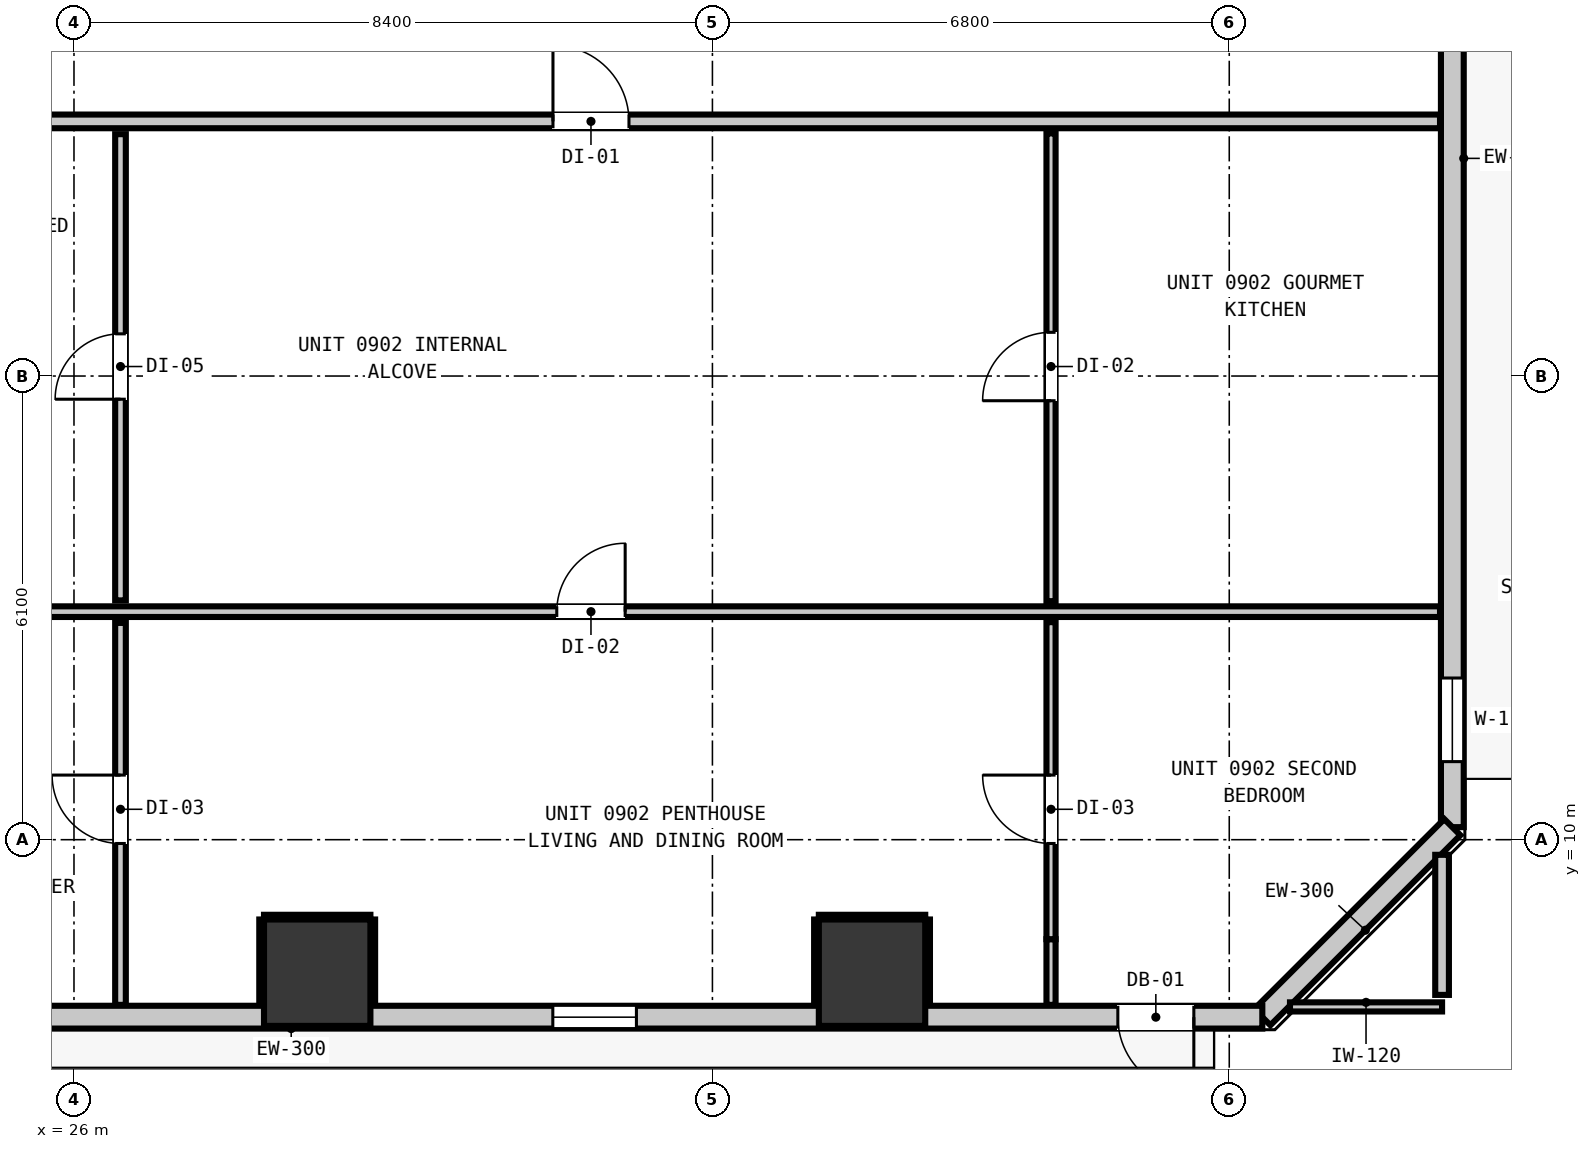
"""IFC4 building model, lengths in metres.
Left out: names, types, materials, properties, quantities, classifications, styles, units other than length and angle.
Written with IfcOpenShell. Run it as: python <this file> out.ifc"""

import sys

from ifc_helpers import new_model, si_unit, direction, frame, frame_2d, origin, origin_2d, place, context, subcontext, project, spatial, rectangle, extrude, element, fill, save


model = new_model("IFC4")
c1 = context("Model", 3, precision=1e-05, world=origin(), true_north=direction((0.0, 1.0)))
c2 = subcontext(c1, "Body", "Model", "MODEL_VIEW")
j1 = project(units=[si_unit("LENGTHUNIT", "METRE"), si_unit("PLANEANGLEUNIT", "RADIAN")], contexts=[c1])
p1 = place(None, origin())
s1 = spatial("IfcSite", under=j1, at=p1, CompositionType="ELEMENT")
p2 = place(p1, origin())
s2 = spatial("IfcBuilding", under=s1, at=p2, CompositionType="ELEMENT")
p3 = place(p2, frame((0.0, 0.0, 35.28)))
s3 = spatial("IfcBuildingStorey", under=s2, at=p3, CompositionType="ELEMENT", Elevation=35.28)
for number, where, z_axis, x_axis in (
    (1, (29.2, 8.25, 0.0), (0.0, 0.0, 1.0), (1.0, 0.0, 0.0)),
    (2, (36.5, 8.25, 0.0), (0.0, 0.0, 1.0), (1.0, 0.0, 0.0)),
):
    element("IfcColumn", number, at=place(p3, frame(where, z_axis=z_axis, x_axis=x_axis)), inside=s3, PredefinedType="COLUMN", context=c2, shape_type="SweptSolid", body=[
        extrude(rectangle(XDim=1.4, YDim=1.4, at=origin_2d()), origin(), (0.0, 0.0, 1.0), 3.32),
    ])
p4 = place(p3, frame((44.135, 44.835, 0.0), z_axis=(0.0, 0.0, 1.0), x_axis=(0.0, -1.0, 0.0)))
e3 = element("IfcWall", 3, at=p4, inside=s3, PredefinedType="STANDARD", context=c2, shape_type="SweptSolid", body=[
    extrude(rectangle(XDim=34.67, YDim=0.3, at=frame_2d((17.335, 0.0))), origin(), (0.0, 0.0, 1.0), 3.06),
])
p5 = place(p4, frame((1.251, 0.0, 0.0)))
e4 = element("IfcOpeningElement", 4, at=p5, cuts=e3, PredefinedType="OPENING", context=c2, shape_type="SweptSolid", body=[
    extrude(rectangle(XDim=1.0, YDim=2.15, at=frame_2d((0.5, 1.075))), frame((0.0, 0.16, 0.0), z_axis=(0.0, -1.0, 0.0), x_axis=(1.0, 0.0, 0.0)), (0.0, 0.0, 1.0), 0.32),
])
p6 = place(p4, frame((32.708, 0.0, 0.85)))
e5 = element("IfcOpeningElement", 5, at=p6, cuts=e3, PredefinedType="OPENING", context=c2, shape_type="SweptSolid", body=[
    extrude(rectangle(XDim=1.1, YDim=2.05, at=frame_2d((0.55, 1.025))), frame((0.0, 0.16, 0.0), z_axis=(0.0, -1.0, 0.0), x_axis=(1.0, 0.0, 0.0)), (0.0, 0.0, 1.0), 0.32),
])
p7 = place(p4, frame((17.935, 0.0, 0.85)))
e6 = element("IfcOpeningElement", 6, at=p7, cuts=e3, PredefinedType="OPENING", context=c2, shape_type="SweptSolid", body=[
    extrude(rectangle(XDim=1.1, YDim=2.05, at=frame_2d((0.55, 1.025))), frame((0.0, 0.16, 0.0), z_axis=(0.0, -1.0, 0.0), x_axis=(1.0, 0.0, 0.0)), (0.0, 0.0, 1.0), 0.32),
])
p8 = place(p4, frame((6.959, 0.0, 0.85)))
e7 = element("IfcOpeningElement", 7, at=p8, cuts=e3, PredefinedType="OPENING", context=c2, shape_type="SweptSolid", body=[
    extrude(rectangle(XDim=1.1, YDim=2.05, at=frame_2d((0.55, 1.025))), frame((0.0, 0.16, 0.0), z_axis=(0.0, -1.0, 0.0), x_axis=(1.0, 0.0, 0.0)), (0.0, 0.0, 1.0), 0.32),
])
p9 = place(p3, frame((44.135, 10.165, 0.0), z_axis=(0.0, 0.0, 1.0), x_axis=(-0.707106781187, -0.707106781187, 0.0)))
e8 = element("IfcWall", 8, at=p9, inside=s3, PredefinedType="STANDARD", context=c2, shape_type="SweptSolid", body=[
    extrude(rectangle(XDim=3.536, YDim=0.3, at=frame_2d((1.768, 0.0))), origin(), (0.0, 0.0, 1.0), 3.06),
])
p10 = place(p3, frame((41.635, 7.665, 0.0), z_axis=(0.0, 0.0, 1.0), x_axis=(-1.0, 0.0, 0.0)))
e9 = element("IfcWall", 9, at=p10, inside=s3, PredefinedType="STANDARD", context=c2, shape_type="SweptSolid", body=[
    extrude(rectangle(XDim=37.47, YDim=0.3, at=frame_2d((18.735, 0.0))), origin(), (0.0, 0.0, 1.0), 3.06),
])
p11 = place(p10, frame((0.901, 0.0, 0.0)))
e10 = element("IfcOpeningElement", 10, at=p11, cuts=e9, PredefinedType="OPENING", context=c2, shape_type="SweptSolid", body=[
    extrude(rectangle(XDim=1.0, YDim=2.15, at=frame_2d((0.5, 1.075))), frame((0.0, 0.16, 0.0), z_axis=(0.0, -1.0, 0.0), x_axis=(1.0, 0.0, 0.0)), (0.0, 0.0, 1.0), 0.32),
])
p12 = place(p10, frame((32.595, 0.0, 0.85)))
e11 = element("IfcOpeningElement", 11, at=p12, cuts=e9, PredefinedType="OPENING", context=c2, shape_type="SweptSolid", body=[
    extrude(rectangle(XDim=1.1, YDim=2.05, at=frame_2d((0.55, 1.025))), frame((0.0, 0.16, 0.0), z_axis=(0.0, -1.0, 0.0), x_axis=(1.0, 0.0, 0.0)), (0.0, 0.0, 1.0), 0.32),
])
p13 = place(p10, frame((36.621, 0.0, 0.85)))
e12 = element("IfcOpeningElement", 12, at=p13, cuts=e9, PredefinedType="OPENING", context=c2, shape_type="SweptSolid", body=[
    extrude(rectangle(XDim=0.58, YDim=1.5, at=frame_2d((0.29, 0.75))), frame((0.0, 0.16, 0.0), z_axis=(0.0, -1.0, 0.0), x_axis=(1.0, 0.0, 0.0)), (0.0, 0.0, 1.0), 0.32),
])
p14 = place(p10, frame((25.295, 0.0, 0.85)))
e13 = element("IfcOpeningElement", 13, at=p14, cuts=e9, PredefinedType="OPENING", context=c2, shape_type="SweptSolid", body=[
    extrude(rectangle(XDim=1.1, YDim=2.05, at=frame_2d((0.55, 1.025))), frame((0.0, 0.16, 0.0), z_axis=(0.0, -1.0, 0.0), x_axis=(1.0, 0.0, 0.0)), (0.0, 0.0, 1.0), 0.32),
])
p15 = place(p10, frame((22.195, 0.0, 0.85)))
e14 = element("IfcOpeningElement", 14, at=p15, cuts=e9, PredefinedType="OPENING", context=c2, shape_type="SweptSolid", body=[
    extrude(rectangle(XDim=1.1, YDim=2.05, at=frame_2d((0.55, 1.025))), frame((0.0, 0.16, 0.0), z_axis=(0.0, -1.0, 0.0), x_axis=(1.0, 0.0, 0.0)), (0.0, 0.0, 1.0), 0.32),
])
p16 = place(p10, frame((8.235, 0.0, 0.85)))
e15 = element("IfcOpeningElement", 15, at=p16, cuts=e9, PredefinedType="OPENING", context=c2, shape_type="SweptSolid", body=[
    extrude(rectangle(XDim=1.1, YDim=2.05, at=frame_2d((0.55, 1.025))), frame((0.0, 0.16, 0.0), z_axis=(0.0, -1.0, 0.0), x_axis=(1.0, 0.0, 0.0)), (0.0, 0.0, 1.0), 0.32),
])
p17 = place(p10, frame((16.219, 0.0, 0.85)))
e16 = element("IfcOpeningElement", 16, at=p17, cuts=e9, PredefinedType="OPENING", context=c2, shape_type="SweptSolid", body=[
    extrude(rectangle(XDim=1.1, YDim=2.05, at=frame_2d((0.55, 1.025))), frame((0.0, 0.16, 0.0), z_axis=(0.0, -1.0, 0.0), x_axis=(1.0, 0.0, 0.0)), (0.0, 0.0, 1.0), 0.32),
])
p18 = place(p3, frame((1.827, 19.45, 0.0), z_axis=(0.0, 0.0, 1.0), x_axis=(1.0, 0.0, 0.0)))
e17 = element("IfcWall", 17, at=p18, inside=s3, PredefinedType="PARTITIONING", context=c2, shape_type="SweptSolid", body=[
    extrude(rectangle(XDim=42.146, YDim=0.18, at=frame_2d((21.073, 0.0))), origin(), (0.0, 0.0, 1.0), 3.06),
])
p19 = place(p18, frame((8.602, 0.0, 0.0)))
e18 = element("IfcOpeningElement", 18, at=p19, cuts=e17, PredefinedType="OPENING", context=c2, shape_type="SweptSolid", body=[
    extrude(rectangle(XDim=1.0, YDim=2.15, at=frame_2d((0.5, 1.075))), frame((0.0, 0.1, 0.0), z_axis=(0.0, -1.0, 0.0), x_axis=(1.0, 0.0, 0.0)), (0.0, 0.0, 1.0), 0.2),
])
p20 = place(p18, frame((30.475, 0.0, 0.0)))
e19 = element("IfcOpeningElement", 19, at=p20, cuts=e17, PredefinedType="OPENING", context=c2, shape_type="SweptSolid", body=[
    extrude(rectangle(XDim=1.0, YDim=2.15, at=frame_2d((0.5, 1.075))), frame((0.0, 0.1, 0.0), z_axis=(0.0, -1.0, 0.0), x_axis=(1.0, 0.0, 0.0)), (0.0, 0.0, 1.0), 0.2),
])
p21 = place(p3, frame((11.688, 13.0, 0.0), z_axis=(0.0, 0.0, 1.0), x_axis=(1.0, 0.0, 0.0)))
e20 = element("IfcWall", 20, at=p21, inside=s3, PredefinedType="PARTITIONING", context=c2, shape_type="SweptSolid", body=[
    extrude(rectangle(XDim=32.285, YDim=0.14, at=frame_2d((16.143, 0.0))), origin(), (0.0, 0.0, 1.0), 3.06),
])
p22 = place(p21, frame((20.664, 0.0, 0.0)))
e21 = element("IfcOpeningElement", 21, at=p22, cuts=e20, PredefinedType="OPENING", context=c2, shape_type="SweptSolid", body=[
    extrude(rectangle(XDim=0.9, YDim=2.1, at=frame_2d((0.45, 1.05))), frame((0.0, 0.08, 0.0), z_axis=(0.0, -1.0, 0.0), x_axis=(1.0, 0.0, 0.0)), (0.0, 0.0, 1.0), 0.16),
])
p23 = place(p3, frame((41.999, 7.8, 0.0), z_axis=(0.0, 0.0, 1.0), x_axis=(1.0, 0.0, 0.0)))
e22 = element("IfcWall", 22, at=p23, inside=s3, PredefinedType="PARTITIONING", context=c2, shape_type="SweptSolid", body=[
    extrude(rectangle(XDim=2.001, YDim=0.12, at=frame_2d((1.0, 0.0))), origin(), (0.0, 0.0, 1.0), 3.06),
])
p24 = place(p3, frame((44.0, 7.958, 0.0), z_axis=(0.0, 0.0, 1.0), x_axis=(0.0, 1.0, 0.0)))
e23 = element("IfcWall", 23, at=p24, inside=s3, PredefinedType="PARTITIONING", context=c2, shape_type="SweptSolid", body=[
    extrude(rectangle(XDim=1.843, YDim=0.18, at=frame_2d((0.921, 0.0))), origin(), (0.0, 0.0, 1.0), 3.06),
])
p25 = place(p3, frame((26.612, 7.827, 0.0), z_axis=(0.0, 0.0, 1.0), x_axis=(0.0, 1.0, 0.0)))
e24 = element("IfcWall", 24, at=p25, inside=s3, PredefinedType="PARTITIONING", context=c2, shape_type="SweptSolid", body=[
    extrude(rectangle(XDim=5.025, YDim=0.14, at=frame_2d((2.513, 0.0))), origin(), (0.0, 0.0, 1.0), 3.06),
])
p26 = place(p25, frame((2.123, 0.0, 0.0)))
e25 = element("IfcOpeningElement", 25, at=p26, cuts=e24, PredefinedType="OPENING", context=c2, shape_type="SweptSolid", body=[
    extrude(rectangle(XDim=0.9, YDim=2.1, at=frame_2d((0.45, 1.05))), frame((0.0, 0.08, 0.0), z_axis=(0.0, -1.0, 0.0), x_axis=(1.0, 0.0, 0.0)), (0.0, 0.0, 1.0), 0.16),
])
p27 = place(p3, frame((26.612, 13.148, 0.0), z_axis=(0.0, 0.0, 1.0), x_axis=(0.0, 1.0, 0.0)))
e26 = element("IfcWall", 26, at=p27, inside=s3, PredefinedType="PARTITIONING", context=c2, shape_type="SweptSolid", body=[
    extrude(rectangle(XDim=6.134, YDim=0.14, at=frame_2d((3.067, 0.0))), origin(), (0.0, 0.0, 1.0), 3.06),
])
p28 = place(p27, frame((2.647, 0.0, 0.0)))
e27 = element("IfcOpeningElement", 27, at=p28, cuts=e26, PredefinedType="OPENING", context=c2, shape_type="SweptSolid", body=[
    extrude(rectangle(XDim=0.86, YDim=2.02, at=frame_2d((0.43, 1.01))), frame((0.0, 0.08, 0.0), z_axis=(0.0, -1.0, 0.0), x_axis=(1.0, 0.0, 0.0)), (0.0, 0.0, 1.0), 0.16),
])
p29 = place(p3, frame((38.855, 7.827, 0.0), z_axis=(0.0, 0.0, 1.0), x_axis=(0.0, 1.0, 0.0)))
e28 = element("IfcWall", 28, at=p29, inside=s3, PredefinedType="PARTITIONING", context=c2, shape_type="SweptSolid", body=[
    extrude(rectangle(XDim=0.864, YDim=0.12, at=frame_2d((0.432, 0.0))), origin(), (0.0, 0.0, 1.0), 3.06),
])
p30 = place(p3, frame((38.855, 8.691, 0.0), z_axis=(0.0, 0.0, 1.0), x_axis=(0.0, 1.0, 0.0)))
e29 = element("IfcWall", 29, at=p30, inside=s3, PredefinedType="PARTITIONING", context=c2, shape_type="SweptSolid", body=[
    extrude(rectangle(XDim=4.171, YDim=0.12, at=frame_2d((2.085, 0.0))), origin(), (0.0, 0.0, 1.0), 2.445),
])
p31 = place(p30, frame((1.259, 0.0, 0.0)))
e30 = element("IfcOpeningElement", 30, at=p31, cuts=e29, PredefinedType="OPENING", context=c2, shape_type="SweptSolid", body=[
    extrude(rectangle(XDim=0.9, YDim=2.1, at=frame_2d((0.45, 1.05))), frame((0.0, 0.07, 0.0), z_axis=(0.0, -1.0, 0.0), x_axis=(1.0, 0.0, 0.0)), (0.0, 0.0, 1.0), 0.14),
])
p32 = place(p3, frame((38.855, 13.138, 0.0), z_axis=(0.0, 0.0, 1.0), x_axis=(0.0, 1.0, 0.0)))
e31 = element("IfcWall", 31, at=p32, inside=s3, PredefinedType="PARTITIONING", context=c2, shape_type="SweptSolid", body=[
    extrude(rectangle(XDim=6.154, YDim=0.12, at=frame_2d((3.077, 0.0))), origin(), (0.0, 0.0, 1.0), 2.445),
])
p33 = place(p32, frame((2.637, 0.0, 0.0)))
e32 = element("IfcOpeningElement", 32, at=p33, cuts=e31, PredefinedType="OPENING", context=c2, shape_type="SweptSolid", body=[
    extrude(rectangle(XDim=0.9, YDim=2.1, at=frame_2d((0.45, 1.05))), frame((0.0, 0.07, 0.0), z_axis=(0.0, -1.0, 0.0), x_axis=(1.0, 0.0, 0.0)), (0.0, 0.0, 1.0), 0.14),
])
p34 = place(p3, frame((28.5, 8.982, 0.0), z_axis=(0.0, 0.0, 1.0), x_axis=(1.0, 0.0, 0.0)))
e33 = element("IfcWall", 33, at=p34, inside=s3, PredefinedType="PARTITIONING", context=c2, shape_type="SweptSolid", body=[
    extrude(rectangle(XDim=1.4, YDim=0.06, at=frame_2d((0.7, 0.0))), origin(), (0.0, 0.0, 1.0), 1.45),
])
for number, where, z_axis, x_axis in (
    (34, (28.468, 7.83, 0.0), (0.0, 0.0, 1.0), (0.0, 1.0, 0.0)),
    (35, (29.932, 7.83, 0.0), (0.0, 0.0, 1.0), (0.0, 1.0, 0.0)),
):
    element("IfcWall", number, at=place(p3, frame(where, z_axis=z_axis, x_axis=x_axis)), inside=s3, PredefinedType="PARTITIONING", context=c2, shape_type="SweptSolid", body=[
        extrude(rectangle(XDim=1.12, YDim=0.06, at=frame_2d((0.56, 0.0))), origin(), (0.0, 0.0, 1.0), 1.45),
    ])
p35 = place(p3, frame((35.8, 8.982, 0.0), z_axis=(0.0, 0.0, 1.0), x_axis=(1.0, 0.0, 0.0)))
e36 = element("IfcWall", 36, at=p35, inside=s3, PredefinedType="PARTITIONING", context=c2, shape_type="SweptSolid", body=[
    extrude(rectangle(XDim=1.4, YDim=0.06, at=frame_2d((0.7, 0.0))), origin(), (0.0, 0.0, 1.0), 1.45),
])
for number, where, z_axis, x_axis in (
    (37, (35.768, 7.83, 0.0), (0.0, 0.0, 1.0), (0.0, 1.0, 0.0)),
    (38, (37.232, 7.83, 0.0), (0.0, 0.0, 1.0), (0.0, 1.0, 0.0)),
):
    element("IfcWall", number, at=place(p3, frame(where, z_axis=z_axis, x_axis=x_axis)), inside=s3, PredefinedType="PARTITIONING", context=c2, shape_type="SweptSolid", body=[
        extrude(rectangle(XDim=1.12, YDim=0.06, at=frame_2d((0.56, 0.0))), origin(), (0.0, 0.0, 1.0), 1.45),
    ])
p36 = place(p11, origin())
e39 = element("IfcDoor", 39, at=p36, inside=s3, OperationType="SINGLE_SWING_LEFT", PredefinedType="DOOR", context=c2, shape_type="SweptSolid", body=[
    extrude(rectangle(XDim=1.0, YDim=2.15, at=frame_2d((0.5, 1.075))), frame((0.0, 0.025, 0.0), z_axis=(0.0, -1.0, 0.0), x_axis=(1.0, 0.0, 0.0)), (0.0, 0.0, 1.0), 0.05),
])
fill(e10, e39)
p37 = place(p6, origin())
e40 = element("IfcWindow", 40, at=p37, inside=s3, PartitioningType="SINGLE_PANEL", PredefinedType="WINDOW", context=c2, shape_type="SweptSolid", body=[
    extrude(rectangle(XDim=1.1, YDim=2.05, at=frame_2d((0.55, 1.025))), frame((0.0, 0.03, 0.0), z_axis=(0.0, -1.0, 0.0), x_axis=(1.0, 0.0, 0.0)), (0.0, 0.0, 1.0), 0.06),
])
fill(e5, e40)
p38 = place(p16, origin())
e41 = element("IfcWindow", 41, at=p38, inside=s3, PartitioningType="SINGLE_PANEL", PredefinedType="WINDOW", context=c2, shape_type="SweptSolid", body=[
    extrude(rectangle(XDim=1.1, YDim=2.05, at=frame_2d((0.55, 1.025))), frame((0.0, 0.03, 0.0), z_axis=(0.0, -1.0, 0.0), x_axis=(1.0, 0.0, 0.0)), (0.0, 0.0, 1.0), 0.06),
])
fill(e15, e41)
p39 = place(p20, origin())
e42 = element("IfcDoor", 42, at=p39, inside=s3, OperationType="SINGLE_SWING_LEFT", PredefinedType="DOOR", context=c2, shape_type="SweptSolid", body=[
    extrude(rectangle(XDim=1.0, YDim=2.15, at=frame_2d((0.5, 1.075))), frame((0.0, 0.025, 0.0), z_axis=(0.0, -1.0, 0.0), x_axis=(1.0, 0.0, 0.0)), (0.0, 0.0, 1.0), 0.05),
])
fill(e19, e42)
p40 = place(p22, origin())
e43 = element("IfcDoor", 43, at=p40, inside=s3, OperationType="SINGLE_SWING_RIGHT", PredefinedType="DOOR", context=c2, shape_type="SweptSolid", body=[
    extrude(rectangle(XDim=0.9, YDim=2.1, at=frame_2d((0.45, 1.05))), frame((0.0, 0.025, 0.0), z_axis=(0.0, -1.0, 0.0), x_axis=(1.0, 0.0, 0.0)), (0.0, 0.0, 1.0), 0.05),
])
fill(e21, e43)
p41 = place(p28, origin())
e44 = element("IfcDoor", 44, at=p41, inside=s3, OperationType="SINGLE_SWING_LEFT", PredefinedType="DOOR", context=c2, shape_type="SweptSolid", body=[
    extrude(rectangle(XDim=0.86, YDim=2.02, at=frame_2d((0.43, 1.01))), frame((0.0, 0.025, 0.0), z_axis=(0.0, -1.0, 0.0), x_axis=(1.0, 0.0, 0.0)), (0.0, 0.0, 1.0), 0.05),
])
fill(e27, e44)
p42 = place(p26, origin())
e45 = element("IfcDoor", 45, at=p42, inside=s3, OperationType="SINGLE_SWING_RIGHT", PredefinedType="DOOR", context=c2, shape_type="SweptSolid", body=[
    extrude(rectangle(XDim=0.9, YDim=2.1, at=frame_2d((0.45, 1.05))), frame((0.0, 0.025, 0.0), z_axis=(0.0, -1.0, 0.0), x_axis=(1.0, 0.0, 0.0)), (0.0, 0.0, 1.0), 0.05),
])
fill(e25, e45)
p43 = place(p33, origin())
e46 = element("IfcDoor", 46, at=p43, inside=s3, OperationType="SINGLE_SWING_LEFT", PredefinedType="DOOR", context=c2, shape_type="SweptSolid", body=[
    extrude(rectangle(XDim=0.9, YDim=2.1, at=frame_2d((0.45, 1.05))), frame((0.0, 0.025, 0.0), z_axis=(0.0, -1.0, 0.0), x_axis=(1.0, 0.0, 0.0)), (0.0, 0.0, 1.0), 0.05),
])
fill(e32, e46)
p44 = place(p31, origin())
e47 = element("IfcDoor", 47, at=p44, inside=s3, OperationType="SINGLE_SWING_RIGHT", PredefinedType="DOOR", context=c2, shape_type="SweptSolid", body=[
    extrude(rectangle(XDim=0.9, YDim=2.1, at=frame_2d((0.45, 1.05))), frame((0.0, 0.025, 0.0), z_axis=(0.0, -1.0, 0.0), x_axis=(1.0, 0.0, 0.0)), (0.0, 0.0, 1.0), 0.05),
])
fill(e30, e47)
save(model, sys.argv[1])
